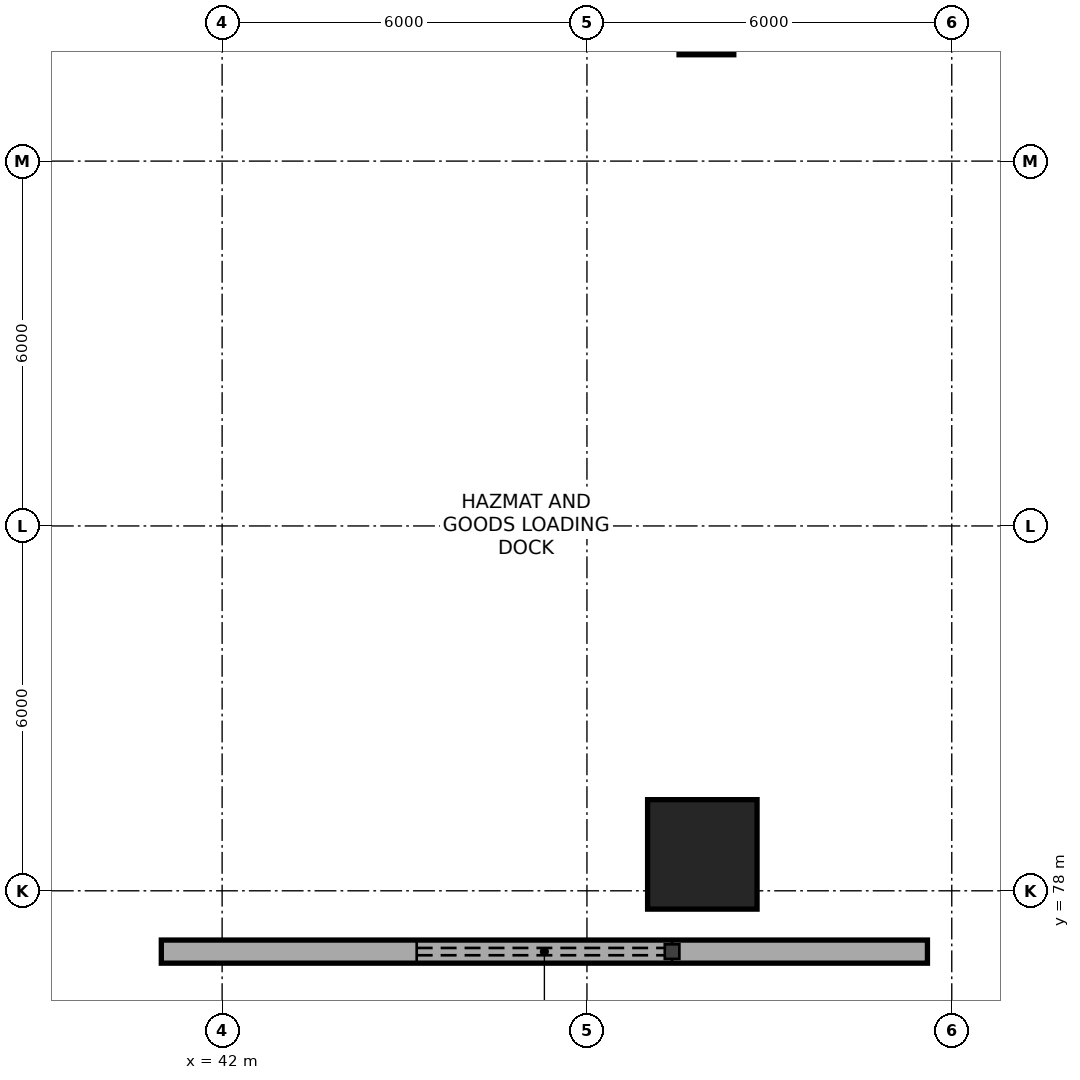
"""IFC4 building model, lengths in metres.
Left out: names, types, materials, properties, quantities, classifications, styles, units other than length and angle.
Written with IfcOpenShell. Run it as: python <this file> out.ifc"""

import sys

from ifc_helpers import new_model, si_unit, direction, frame, frame_2d, origin, origin_2d, place, context, subcontext, project, spatial, rectangle, extrude, element, fill, save


model = new_model("IFC4")
c1 = context("Model", 3, precision=1e-05, world=origin(), true_north=direction((0.0, 1.0)))
c2 = subcontext(c1, "Body", "Model", "MODEL_VIEW")
j1 = project(units=[si_unit("LENGTHUNIT", "METRE"), si_unit("PLANEANGLEUNIT", "RADIAN")], contexts=[c1])
p1 = place(None, origin())
s1 = spatial("IfcSite", under=j1, at=p1, CompositionType="ELEMENT")
p2 = place(p1, origin())
s2 = spatial("IfcBuilding", under=s1, at=p2, CompositionType="ELEMENT")
p3 = place(p2, frame((0.0, 0.0, -4.8)))
s3 = spatial("IfcBuildingStorey", under=s2, at=p3, CompositionType="ELEMENT", Elevation=-4.8)
p4 = place(p3, frame((49.898, 78.599, 0.0), z_axis=(0.0, 0.0, 1.0), x_axis=(1.0, 0.0, 0.0)))
e1 = element("IfcColumn", 1, at=p4, inside=s3, PredefinedType="COLUMN", context=c2, shape_type="SweptSolid", body=[
    extrude(rectangle(XDim=1.8, YDim=1.8, at=origin_2d()), origin(), (0.0, 0.0, 1.0), 4.8),
])
p5 = place(p3, frame((49.916, 92.26, 0.003), z_axis=(0.020409765916, -0.02544858593, 0.999467763827), x_axis=(-0.780107149771, -0.625645934116, 0.0)))
e2 = element("IfcColumn", 2, at=p5, inside=s3, PredefinedType="COLUMN", context=c2, shape_type="SweptSolid", body=[
    extrude(rectangle(XDim=0.9, YDim=0.9, at=origin_2d()), origin(), (0.0, 0.0, 1.0), 4.797),
])
p6 = place(p3, frame((53.6, 77.0, 0.0), z_axis=(0.0, 0.0, 1.0), x_axis=(-1.0, 0.0, 0.0)))
e3 = element("IfcWall", 3, at=p6, inside=s3, PredefinedType="STANDARD", context=c2, shape_type="SweptSolid", body=[
    extrude(rectangle(XDim=12.6, YDim=0.38, at=frame_2d((6.3, 0.0))), origin(), (0.0, 0.0, 1.0), 3.43),
])
p7 = place(p6, frame((4.2, 0.0, 0.0)))
e4 = element("IfcOpeningElement", 4, at=p7, cuts=e3, PredefinedType="OPENING", context=c2, shape_type="SweptSolid", body=[
    extrude(rectangle(XDim=4.2, YDim=3.15, at=frame_2d((2.1, 1.575))), frame((0.0, 0.2, 0.0), z_axis=(0.0, -1.0, 0.0), x_axis=(1.0, 0.0, 0.0)), (0.0, 0.0, 1.0), 0.4),
])
p8 = place(p7, origin())
e5 = element("IfcDoor", 5, at=p8, inside=s3, OperationType="ROLLINGUP", PredefinedType="GATE", context=c2, shape_type="SweptSolid", body=[
    extrude(rectangle(XDim=4.2, YDim=3.15, at=frame_2d((2.1, 1.575))), frame((0.0, 0.025, 0.0), z_axis=(0.0, -1.0, 0.0), x_axis=(1.0, 0.0, 0.0)), (0.0, 0.0, 1.0), 0.05),
])
fill(e4, e5)
save(model, sys.argv[1])
